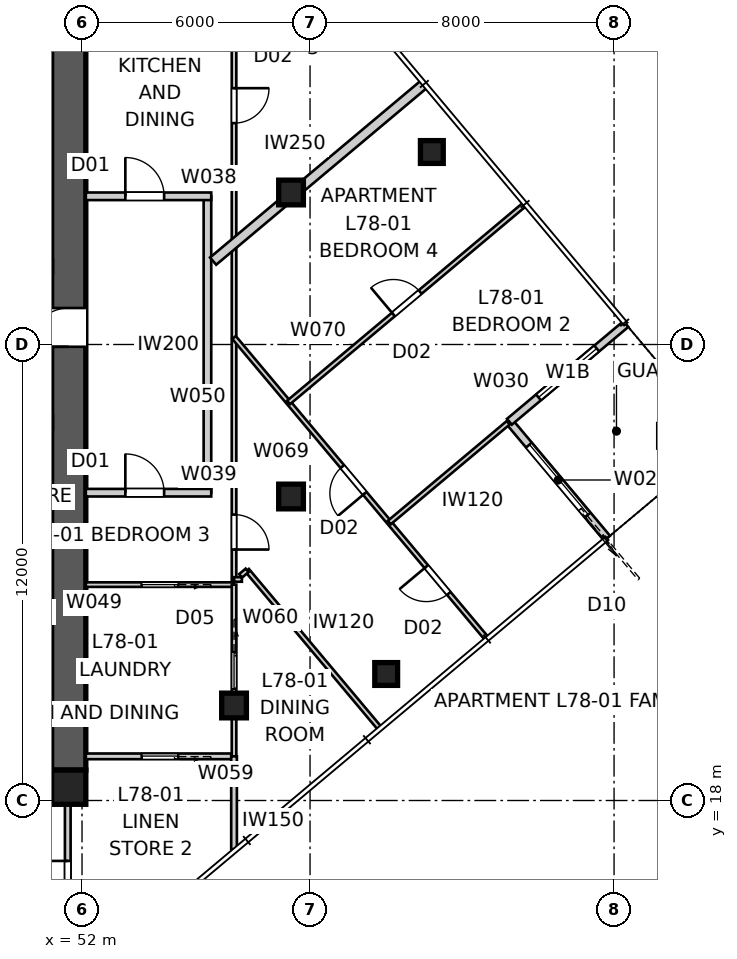
"""IFC4 building model, lengths in metres.
Left out: names, types, materials, properties, quantities, classifications, styles, units other than length and angle.
Written with IfcOpenShell. Run it as: python <this file> out.ifc"""

import sys

from ifc_helpers import new_model, si_unit, direction, frame, frame_2d, origin, origin_2d, place, context, subcontext, project, spatial, polyline, rectangle, outline, extrude, element, fill, save


model = new_model("IFC4")
c1 = context("Model", 3, precision=1e-05, world=origin(), true_north=direction((0.0, 1.0)))
c2 = subcontext(c1, "Body", "Model", "MODEL_VIEW")
j1 = project(units=[si_unit("LENGTHUNIT", "METRE"), si_unit("PLANEANGLEUNIT", "RADIAN")], contexts=[c1])
p1 = place(None, origin())
s1 = spatial("IfcSite", under=j1, at=p1, CompositionType="ELEMENT")
p2 = place(p1, origin())
s2 = spatial("IfcBuilding", under=s1, at=p2, CompositionType="ELEMENT")
p3 = place(p2, frame((0.0, 0.0, 282.8)))
s3 = spatial("IfcBuildingStorey", under=s2, at=p3, CompositionType="ELEMENT", Elevation=282.8)
p4 = place(p3, frame((51.2, 18.35, 0.0), z_axis=(0.0, 0.0, 1.0), x_axis=(-1.0, 0.0, 0.0)))
e1 = element("IfcWall", 1, at=p4, inside=s3, PredefinedType="SHEAR", context=c2, shape_type="SweptSolid", body=[
    extrude(outline(polyline([(0.0, -0.45), (22.4, -0.45), (22.4, -0.025), (22.85, -0.025), (22.85, 0.025), (22.4, 0.025), (22.4, 0.45), (0.0, 0.45), (0.0, 0.025), (-0.45, 0.025), (-0.45, -0.025), (0.0, -0.025), (0.0, -0.45)])), origin(), (0.0, 0.0, 1.0), 3.4),
])
p5 = place(p3, frame((51.65, 18.8, 0.0), z_axis=(0.0, 0.0, 1.0), x_axis=(0.0, 1.0, 0.0)))
e2 = element("IfcWall", 2, at=p5, inside=s3, PredefinedType="SHEAR", context=c2, shape_type="SweptSolid", body=[
    extrude(outline(polyline([(0.0, -0.45), (22.4, -0.45), (22.4, -0.025), (22.85, -0.025), (22.85, 0.025), (22.4, 0.025), (22.4, 0.45), (0.0, 0.45), (0.0, 0.025), (-0.45, 0.025), (-0.45, -0.025), (0.0, -0.025), (0.0, -0.45)])), origin(), (0.0, 0.0, 1.0), 3.4),
])
p6 = place(p5, frame((11.14, 0.0, 0.0)))
e3 = element("IfcOpeningElement", 3, at=p6, cuts=e2, PredefinedType="OPENING", context=c2, shape_type="SweptSolid", body=[
    extrude(rectangle(XDim=1.02, YDim=2.4, at=frame_2d((0.51, 1.2))), frame((0.0, 0.46, 0.0), z_axis=(0.0, -1.0, 0.0), x_axis=(1.0, 0.0, 0.0)), (0.0, 0.0, 1.0), 0.92),
])
p7 = place(p3, frame((51.65, 18.35, 0.0), z_axis=(0.0, 0.0, 1.0), x_axis=(1.0, 0.0, 0.0)))
e4 = element("IfcColumn", 4, at=p7, inside=s3, PredefinedType="COLUMN", context=c2, shape_type="SweptSolid", body=[
    extrude(rectangle(XDim=0.9, YDim=0.9, at=origin_2d()), origin(), (0.0, 0.0, 1.0), 3.4),
])
for number, where, z_axis, x_axis in (
    (5, (60.003, 21.329, 0.0), (0.0, 0.0, 1.0), (1.0, 0.0, 0.0)),
    (6, (61.205, 35.065, 0.0), (0.0, 0.0, 1.0), (1.0, 0.0, 0.0)),
):
    element("IfcColumn", number, at=place(p3, frame(where, z_axis=z_axis, x_axis=x_axis)), inside=s3, PredefinedType="COLUMN", context=c2, shape_type="SweptSolid", body=[
        extrude(rectangle(XDim=0.6, YDim=0.6, at=origin_2d()), origin(), (0.0, 0.0, 1.0), 3.4),
    ])
for number, where, z_axis, x_axis in (
    (7, (57.5, 26.0, 0.0), (0.0, 0.0, 1.0), (1.0, 0.0, 0.0)),
    (8, (57.5, 34.0, 0.0), (0.0, 0.0, 1.0), (1.0, 0.0, 0.0)),
    (9, (56.0, 20.5, 0.0), (0.0, 0.0, 1.0), (1.0, 0.0, 0.0)),
):
    element("IfcColumn", number, at=place(p3, frame(where, z_axis=z_axis, x_axis=x_axis)), inside=s3, PredefinedType="COLUMN", context=c2, shape_type="SweptSolid", body=[
        extrude(rectangle(XDim=0.65, YDim=0.65, at=origin_2d()), origin(), (0.0, 0.0, 1.0), 3.4),
    ])
p8 = place(p3, frame((65.817, 24.902, 0.0), z_axis=(0.0, 0.0, 1.0), x_axis=(-0.642768287094, 0.766060656284, 0.0)))
e10 = element("IfcWall", 10, at=p8, inside=s3, PredefinedType="SOLIDWALL", context=c2, shape_type="SweptSolid", body=[
    extrude(rectangle(XDim=4.0, YDim=0.2, at=frame_2d((2.0, 0.0))), origin(), (0.0, 0.0, 1.0), 3.25),
])
p9 = place(p8, frame((0.8, 0.0, 0.0)))
e11 = element("IfcOpeningElement", 11, at=p9, cuts=e10, PredefinedType="OPENING", context=c2, shape_type="SweptSolid", body=[
    extrude(rectangle(XDim=2.4, YDim=2.4, at=frame_2d((1.2, 1.2))), frame((0.0, 0.11, 0.0), z_axis=(0.0, -1.0, 0.0), x_axis=(1.0, 0.0, 0.0)), (0.0, 0.0, 1.0), 0.22),
])
p10 = place(p3, frame((63.246, 27.966, 0.0), z_axis=(0.0, 0.0, 1.0), x_axis=(0.766035437498, 0.642798342015, 0.0)))
e12 = element("IfcWall", 12, at=p10, inside=s3, PredefinedType="SOLIDWALL", context=c2, shape_type="SweptSolid", body=[
    extrude(rectangle(XDim=4.0, YDim=0.2, at=frame_2d((2.0, 0.0))), origin(), (0.0, 0.0, 1.0), 3.25),
])
p11 = place(p10, frame((1.0, 0.0, 0.45)))
e13 = element("IfcOpeningElement", 13, at=p11, cuts=e12, PredefinedType="OPENING", context=c2, shape_type="SweptSolid", body=[
    extrude(rectangle(XDim=2.0, YDim=1.8, at=frame_2d((1.0, 0.9))), frame((0.0, 0.11, 0.0), z_axis=(0.0, -1.0, 0.0), x_axis=(1.0, 0.0, 0.0)), (0.0, 0.0, 1.0), 0.22),
])
p12 = place(p3, frame((55.3, 26.1, 0.0), z_axis=(0.0, 0.0, 1.0), x_axis=(0.0, 1.0, 0.0)))
e14 = element("IfcWall", 14, at=p12, inside=s3, PredefinedType="PARTITIONING", context=c2, shape_type="SweptSolid", body=[
    extrude(rectangle(XDim=7.8, YDim=0.2, at=frame_2d((3.9, 0.0))), origin(), (0.0, 0.0, 1.0), 3.25),
])
p13 = place(p3, frame((52.1, 33.9, 0.0), z_axis=(0.0, 0.0, 1.0), x_axis=(1.0, 0.0, 0.0)))
e15 = element("IfcWall", 15, at=p13, inside=s3, PredefinedType="PARTITIONING", context=c2, shape_type="SweptSolid", body=[
    extrude(rectangle(XDim=3.3, YDim=0.2, at=frame_2d((1.65, 0.0))), origin(), (0.0, 0.0, 1.0), 3.25),
])
p14 = place(p13, frame((1.04, 0.0, 0.0)))
e16 = element("IfcOpeningElement", 16, at=p14, cuts=e15, PredefinedType="OPENING", context=c2, shape_type="SweptSolid", body=[
    extrude(rectangle(XDim=1.02, YDim=2.34, at=frame_2d((0.51, 1.17))), frame((0.0, 0.11, 0.0), z_axis=(0.0, -1.0, 0.0), x_axis=(1.0, 0.0, 0.0)), (0.0, 0.0, 1.0), 0.22),
])
p15 = place(p3, frame((52.1, 26.1, 0.0), z_axis=(0.0, 0.0, 1.0), x_axis=(1.0, 0.0, 0.0)))
e17 = element("IfcWall", 17, at=p15, inside=s3, PredefinedType="PARTITIONING", context=c2, shape_type="SweptSolid", body=[
    extrude(rectangle(XDim=3.3, YDim=0.2, at=frame_2d((1.65, 0.0))), origin(), (0.0, 0.0, 1.0), 3.25),
])
p16 = place(p15, frame((1.04, 0.0, 0.0)))
e18 = element("IfcOpeningElement", 18, at=p16, cuts=e17, PredefinedType="OPENING", context=c2, shape_type="SweptSolid", body=[
    extrude(rectangle(XDim=1.02, YDim=2.34, at=frame_2d((0.51, 1.17))), frame((0.0, 0.11, 0.0), z_axis=(0.0, -1.0, 0.0), x_axis=(1.0, 0.0, 0.0)), (0.0, 0.0, 1.0), 0.22),
])
p17 = place(p3, frame((61.007, 36.857, 0.0), z_axis=(0.0, 0.0, 1.0), x_axis=(-0.766054150891, -0.642776040237, 0.0)))
e19 = element("IfcWall", 19, at=p17, inside=s3, PredefinedType="PARTITIONING", context=c2, shape_type="SweptSolid", body=[
    extrude(rectangle(XDim=7.254, YDim=0.25, at=frame_2d((3.627, 0.0))), origin(), (0.0, 0.0, 1.0), 3.25),
])
p18 = place(p3, frame((56.0, 23.681, 0.0), z_axis=(0.0, 0.0, 1.0), x_axis=(-1.0, 0.0, 0.0)))
e20 = element("IfcWall", 20, at=p18, inside=s3, PredefinedType="PARTITIONING", context=c2, shape_type="SweptSolid", body=[
    extrude(rectangle(XDim=3.9, YDim=0.12, at=frame_2d((1.95, 0.0))), origin(), (0.0, 0.0, 1.0), 3.25),
])
p19 = place(p18, frame((1.47, 0.0, 0.0)))
e21 = element("IfcOpeningElement", 21, at=p19, cuts=e20, PredefinedType="OPENING", context=c2, shape_type="SweptSolid", body=[
    extrude(rectangle(XDim=0.96, YDim=2.1, at=frame_2d((0.48, 1.05))), frame((0.0, 0.07, 0.0), z_axis=(0.0, -1.0, 0.0), x_axis=(1.0, 0.0, 0.0)), (0.0, 0.0, 1.0), 0.14),
])
p20 = place(p3, frame((56.0, 42.762, 0.0), z_axis=(0.0, 0.0, 1.0), x_axis=(0.0, -1.0, 0.0)))
e22 = element("IfcWall", 22, at=p20, inside=s3, PredefinedType="PARTITIONING", context=c2, shape_type="SweptSolid", body=[
    extrude(rectangle(XDim=18.995, YDim=0.12, at=frame_2d((9.498, 0.0))), origin(), (0.0, 0.0, 1.0), 2.549),
])
p21 = place(p20, frame((17.238, 0.0, 0.0)))
e23 = element("IfcOpeningElement", 23, at=p21, cuts=e22, PredefinedType="OPENING", context=c2, shape_type="SweptSolid", body=[
    extrude(rectangle(XDim=0.92, YDim=2.34, at=frame_2d((0.46, 1.17))), frame((0.0, 0.07, 0.0), z_axis=(0.0, -1.0, 0.0), x_axis=(1.0, 0.0, 0.0)), (0.0, 0.0, 1.0), 0.14),
])
p22 = place(p20, frame((6.017, 0.0, 0.0)))
e24 = element("IfcOpeningElement", 24, at=p22, cuts=e22, PredefinedType="OPENING", context=c2, shape_type="SweptSolid", body=[
    extrude(rectangle(XDim=0.92, YDim=2.34, at=frame_2d((0.46, 1.17))), frame((0.0, 0.07, 0.0), z_axis=(0.0, -1.0, 0.0), x_axis=(1.0, 0.0, 0.0)), (0.0, 0.0, 1.0), 0.14),
])
p23 = place(p3, frame((56.0, 19.162, 0.0), z_axis=(0.0, 0.0, 1.0), x_axis=(-1.0, 0.0, 0.0)))
e25 = element("IfcWall", 25, at=p23, inside=s3, PredefinedType="SOLIDWALL", context=c2, shape_type="SweptSolid", body=[
    extrude(rectangle(XDim=3.9, YDim=0.15, at=frame_2d((1.95, 0.0))), origin(), (0.0, 0.0, 1.0), 3.25),
])
p24 = place(p23, frame((1.47, 0.0, 0.0)))
e26 = element("IfcOpeningElement", 26, at=p24, cuts=e25, PredefinedType="OPENING", context=c2, shape_type="SweptSolid", body=[
    extrude(rectangle(XDim=0.96, YDim=2.1, at=frame_2d((0.48, 1.05))), frame((0.0, 0.085, 0.0), z_axis=(0.0, -1.0, 0.0), x_axis=(1.0, 0.0, 0.0)), (0.0, 0.0, 1.0), 0.17),
])
p25 = place(p3, frame((56.0, 23.681, 0.0), z_axis=(0.0, 0.0, 1.0), x_axis=(0.0, -1.0, 0.0)))
e27 = element("IfcWall", 27, at=p25, inside=s3, PredefinedType="PARTITIONING", context=c2, shape_type="SweptSolid", body=[
    extrude(rectangle(XDim=4.519, YDim=0.12, at=frame_2d((2.26, 0.0))), origin(), (0.0, 0.0, 1.0), 2.549),
])
p26 = place(p25, frame((1.78, 0.0, 0.0)))
e28 = element("IfcOpeningElement", 28, at=p26, cuts=e27, PredefinedType="OPENING", context=c2, shape_type="SweptSolid", body=[
    extrude(rectangle(XDim=0.96, YDim=2.1, at=frame_2d((0.48, 1.05))), frame((0.0, 0.07, 0.0), z_axis=(0.0, -1.0, 0.0), x_axis=(1.0, 0.0, 0.0)), (0.0, 0.0, 1.0), 0.14),
])
p27 = place(p3, frame((51.625, 14.0, 0.0), z_axis=(0.0, 0.0, 1.0), x_axis=(0.0, 1.0, 0.0)))
e29 = element("IfcWall", 29, at=p27, inside=s3, PredefinedType="SOLIDWALL", context=c2, shape_type="SweptSolid", body=[
    extrude(rectangle(XDim=3.9, YDim=0.15, at=frame_2d((1.95, 0.0))), origin(), (0.0, 0.0, 1.0), 3.25),
])
p28 = place(p27, frame((1.49, 0.0, 0.0)))
e30 = element("IfcOpeningElement", 30, at=p28, cuts=e29, PredefinedType="OPENING", context=c2, shape_type="SweptSolid", body=[
    extrude(rectangle(XDim=0.92, YDim=2.1, at=frame_2d((0.46, 1.05))), frame((0.0, 0.085, 0.0), z_axis=(0.0, -1.0, 0.0), x_axis=(1.0, 0.0, 0.0)), (0.0, 0.0, 1.0), 0.17),
])
p29 = place(p3, frame((56.0, 19.162, 0.0), z_axis=(0.0, 0.0, 1.0), x_axis=(0.0, -1.0, 0.0)))
e31 = element("IfcWall", 31, at=p29, inside=s3, PredefinedType="SOLIDWALL", context=c2, shape_type="SweptSolid", body=[
    extrude(rectangle(XDim=2.445, YDim=0.15, at=frame_2d((1.222, 0.0))), origin(), (0.0, 0.0, 1.0), 3.25),
])
p30 = place(p3, frame((62.631, 22.281, 0.0), z_axis=(0.0, 0.0, 1.0), x_axis=(-0.64277851249, 0.766052076481, 0.0)))
e32 = element("IfcWall", 32, at=p30, inside=s3, PredefinedType="PARTITIONING", context=c2, shape_type="SweptSolid", body=[
    extrude(rectangle(XDim=10.316, YDim=0.12, at=frame_2d((5.158, 0.0))), origin(), (0.0, 0.0, 1.0), 3.25),
])
p31 = place(p30, frame((4.962, 0.0, 0.0)))
e33 = element("IfcOpeningElement", 33, at=p31, cuts=e32, PredefinedType="OPENING", context=c2, shape_type="SweptSolid", body=[
    extrude(rectangle(XDim=0.92, YDim=2.34, at=frame_2d((0.46, 1.17))), frame((0.0, 0.07, 0.0), z_axis=(0.0, -1.0, 0.0), x_axis=(1.0, 0.0, 0.0)), (0.0, 0.0, 1.0), 0.14),
])
p32 = place(p30, frame((1.525, 0.0, 0.0)))
e34 = element("IfcOpeningElement", 34, at=p32, cuts=e32, PredefinedType="OPENING", context=c2, shape_type="SweptSolid", body=[
    extrude(rectangle(XDim=0.92, YDim=2.34, at=frame_2d((0.46, 1.17))), frame((0.0, 0.07, 0.0), z_axis=(0.0, -1.0, 0.0), x_axis=(1.0, 0.0, 0.0)), (0.0, 0.0, 1.0), 0.14),
])
p33 = place(p3, frame((57.434, 28.475, 0.0), z_axis=(0.0, 0.0, 1.0), x_axis=(0.766033729027, 0.642800378028, 0.0)))
e35 = element("IfcWall", 35, at=p33, inside=s3, PredefinedType="PARTITIONING", context=c2, shape_type="SweptSolid", body=[
    extrude(rectangle(XDim=8.085, YDim=0.12, at=frame_2d((4.042, 0.0))), origin(), (0.0, 0.0, 1.0), 3.25),
])
p34 = place(p33, frame((3.603, 0.0, 0.0)))
e36 = element("IfcOpeningElement", 36, at=p34, cuts=e35, PredefinedType="OPENING", context=c2, shape_type="SweptSolid", body=[
    extrude(rectangle(XDim=0.92, YDim=2.34, at=frame_2d((0.46, 1.17))), frame((0.0, 0.07, 0.0), z_axis=(0.0, -1.0, 0.0), x_axis=(1.0, 0.0, 0.0)), (0.0, 0.0, 1.0), 0.14),
])
p35 = place(p3, frame((63.215, 27.94, 0.0), z_axis=(0.0, 0.0, 1.0), x_axis=(-0.766036790562, -0.642796729538, 0.0)))
e37 = element("IfcWall", 37, at=p35, inside=s3, PredefinedType="PARTITIONING", context=c2, shape_type="SweptSolid", body=[
    extrude(rectangle(XDim=4.085, YDim=0.12, at=frame_2d((2.042, 0.0))), origin(), (0.0, 0.0, 1.0), 3.25),
])
p36 = place(p3, frame((59.816, 19.919, 0.0), z_axis=(0.0, 0.0, 1.0), x_axis=(-0.642773197476, 0.766056536168, 0.0)))
e38 = element("IfcWall", 38, at=p36, inside=s3, PredefinedType="PARTITIONING", context=c2, shape_type="SweptSolid", body=[
    extrude(rectangle(XDim=5.4, YDim=0.12, at=frame_2d((2.7, 0.0))), origin(), (0.0, 0.0, 1.0), 3.25),
])
p37 = place(p3, frame((56.345, 24.056, 0.0), z_axis=(0.0, 0.0, 1.0), x_axis=(-0.766260492227, -0.642530044474, 0.0)))
e39 = element("IfcWall", 39, at=p37, inside=s3, PredefinedType="PARTITIONING", context=c2, shape_type="SweptSolid", body=[
    extrude(rectangle(XDim=0.225, YDim=0.12, at=frame_2d((0.112, 0.0))), origin(), (0.0, 0.0, 1.0), 3.25),
])
p38 = place(p3, frame((56.207, 23.817, 0.0), z_axis=(0.0, 0.0, 1.0), x_axis=(-1.0, 0.0, 0.0)))
e40 = element("IfcWall", 40, at=p38, inside=s3, PredefinedType="PARTITIONING", context=c2, shape_type="SweptSolid", body=[
    extrude(rectangle(XDim=0.207, YDim=0.12, at=frame_2d((0.104, 0.0))), origin(), (0.0, 0.0, 1.0), 3.25),
])
p39 = place(p3, frame((51.625, 17.9, 0.0), z_axis=(0.0, 0.0, 1.0), x_axis=(0.027925096799, 0.999610018442, 0.0)))
e41 = element("IfcWall", 41, at=p39, inside=s3, PredefinedType="SOLIDWALL", context=c2, shape_type="SweptSolid", body=[
    extrude(rectangle(XDim=0.9, YDim=0.15, at=frame_2d((0.45, 0.0))), origin(), (0.0, 0.0, 1.0), 3.25),
])
p40 = place(p9, origin())
e42 = element("IfcDoor", 42, at=p40, inside=s3, OperationType="SLIDING_TO_LEFT", PredefinedType="DOOR", context=c2, shape_type="SweptSolid", body=[
    extrude(rectangle(XDim=2.4, YDim=2.4, at=frame_2d((1.2, 1.2))), frame((0.0, 0.025, 0.0), z_axis=(0.0, -1.0, 0.0), x_axis=(1.0, 0.0, 0.0)), (0.0, 0.0, 1.0), 0.05),
])
fill(e11, e42)
p41 = place(p11, origin())
e43 = element("IfcWindow", 43, at=p41, inside=s3, PartitioningType="SINGLE_PANEL", PredefinedType="WINDOW", context=c2, shape_type="SweptSolid", body=[
    extrude(rectangle(XDim=2.0, YDim=1.8, at=frame_2d((1.0, 0.9))), frame((0.0, 0.03, 0.0), z_axis=(0.0, -1.0, 0.0), x_axis=(1.0, 0.0, 0.0)), (0.0, 0.0, 1.0), 0.06),
])
fill(e13, e43)
p42 = place(p16, origin())
e44 = element("IfcDoor", 44, at=p42, inside=s3, OperationType="SINGLE_SWING_LEFT", PredefinedType="DOOR", context=c2, shape_type="SweptSolid", body=[
    extrude(rectangle(XDim=1.02, YDim=2.34, at=frame_2d((0.51, 1.17))), frame((0.0, 0.025, 0.0), z_axis=(0.0, -1.0, 0.0), x_axis=(1.0, 0.0, 0.0)), (0.0, 0.0, 1.0), 0.05),
])
fill(e18, e44)
p43 = place(p14, origin())
e45 = element("IfcDoor", 45, at=p43, inside=s3, OperationType="SINGLE_SWING_LEFT", PredefinedType="DOOR", context=c2, shape_type="SweptSolid", body=[
    extrude(rectangle(XDim=1.02, YDim=2.34, at=frame_2d((0.51, 1.17))), frame((0.0, 0.025, 0.0), z_axis=(0.0, -1.0, 0.0), x_axis=(1.0, 0.0, 0.0)), (0.0, 0.0, 1.0), 0.05),
])
fill(e16, e45)
p44 = place(p21, origin())
e46 = element("IfcDoor", 46, at=p44, inside=s3, OperationType="SINGLE_SWING_RIGHT", PredefinedType="DOOR", context=c2, shape_type="SweptSolid", body=[
    extrude(rectangle(XDim=0.92, YDim=2.34, at=frame_2d((0.46, 1.17))), frame((0.0, 0.025, 0.0), z_axis=(0.0, -1.0, 0.0), x_axis=(1.0, 0.0, 0.0)), (0.0, 0.0, 1.0), 0.05),
])
fill(e23, e46)
p45 = place(p19, origin())
e47 = element("IfcDoor", 47, at=p45, inside=s3, OperationType="SLIDING_TO_LEFT", PredefinedType="DOOR", context=c2, shape_type="SweptSolid", body=[
    extrude(rectangle(XDim=0.96, YDim=2.1, at=frame_2d((0.48, 1.05))), frame((0.0, 0.025, 0.0), z_axis=(0.0, -1.0, 0.0), x_axis=(1.0, 0.0, 0.0)), (0.0, 0.0, 1.0), 0.05),
])
fill(e21, e47)
p46 = place(p22, origin())
e48 = element("IfcDoor", 48, at=p46, inside=s3, OperationType="SINGLE_SWING_LEFT", PredefinedType="DOOR", context=c2, shape_type="SweptSolid", body=[
    extrude(rectangle(XDim=0.92, YDim=2.34, at=frame_2d((0.46, 1.17))), frame((0.0, 0.025, 0.0), z_axis=(0.0, -1.0, 0.0), x_axis=(1.0, 0.0, 0.0)), (0.0, 0.0, 1.0), 0.05),
])
fill(e24, e48)
p47 = place(p26, origin())
e49 = element("IfcDoor", 49, at=p47, inside=s3, OperationType="SLIDING_TO_LEFT", PredefinedType="DOOR", context=c2, shape_type="SweptSolid", body=[
    extrude(rectangle(XDim=0.96, YDim=2.1, at=frame_2d((0.48, 1.05))), frame((0.0, 0.025, 0.0), z_axis=(0.0, -1.0, 0.0), x_axis=(1.0, 0.0, 0.0)), (0.0, 0.0, 1.0), 0.05),
])
fill(e28, e49)
p48 = place(p24, origin())
e50 = element("IfcDoor", 50, at=p48, inside=s3, OperationType="SLIDING_TO_LEFT", PredefinedType="DOOR", context=c2, shape_type="SweptSolid", body=[
    extrude(rectangle(XDim=0.96, YDim=2.1, at=frame_2d((0.48, 1.05))), frame((0.0, 0.025, 0.0), z_axis=(0.0, -1.0, 0.0), x_axis=(1.0, 0.0, 0.0)), (0.0, 0.0, 1.0), 0.05),
])
fill(e26, e50)
p49 = place(p28, origin())
e51 = element("IfcDoor", 51, at=p49, inside=s3, OperationType="SINGLE_SWING_RIGHT", PredefinedType="DOOR", context=c2, shape_type="SweptSolid", body=[
    extrude(rectangle(XDim=0.92, YDim=2.1, at=frame_2d((0.46, 1.05))), frame((0.0, 0.025, 0.0), z_axis=(0.0, -1.0, 0.0), x_axis=(1.0, 0.0, 0.0)), (0.0, 0.0, 1.0), 0.05),
])
fill(e30, e51)
p50 = place(p31, origin())
e52 = element("IfcDoor", 52, at=p50, inside=s3, OperationType="SINGLE_SWING_LEFT", PredefinedType="DOOR", context=c2, shape_type="SweptSolid", body=[
    extrude(rectangle(XDim=0.92, YDim=2.34, at=frame_2d((0.46, 1.17))), frame((0.0, 0.025, 0.0), z_axis=(0.0, -1.0, 0.0), x_axis=(1.0, 0.0, 0.0)), (0.0, 0.0, 1.0), 0.05),
])
fill(e33, e52)
p51 = place(p32, origin())
e53 = element("IfcDoor", 53, at=p51, inside=s3, OperationType="SINGLE_SWING_RIGHT", PredefinedType="DOOR", context=c2, shape_type="SweptSolid", body=[
    extrude(rectangle(XDim=0.92, YDim=2.34, at=frame_2d((0.46, 1.17))), frame((0.0, 0.025, 0.0), z_axis=(0.0, -1.0, 0.0), x_axis=(1.0, 0.0, 0.0)), (0.0, 0.0, 1.0), 0.05),
])
fill(e34, e53)
p52 = place(p34, origin())
e54 = element("IfcDoor", 54, at=p52, inside=s3, OperationType="SINGLE_SWING_LEFT", PredefinedType="DOOR", context=c2, shape_type="SweptSolid", body=[
    extrude(rectangle(XDim=0.92, YDim=2.34, at=frame_2d((0.46, 1.17))), frame((0.0, 0.025, 0.0), z_axis=(0.0, -1.0, 0.0), x_axis=(1.0, 0.0, 0.0)), (0.0, 0.0, 1.0), 0.05),
])
fill(e36, e54)
p53 = place(p6, origin())
e55 = element("IfcDoor", 55, at=p53, inside=s3, OperationType="SINGLE_SWING_LEFT", PredefinedType="DOOR", context=c2, shape_type="SweptSolid", body=[
    extrude(rectangle(XDim=1.02, YDim=2.4, at=frame_2d((0.51, 1.2))), frame((0.0, 0.025, 0.0), z_axis=(0.0, -1.0, 0.0), x_axis=(1.0, 0.0, 0.0)), (0.0, 0.0, 1.0), 0.05),
])
fill(e3, e55)
save(model, sys.argv[1])
